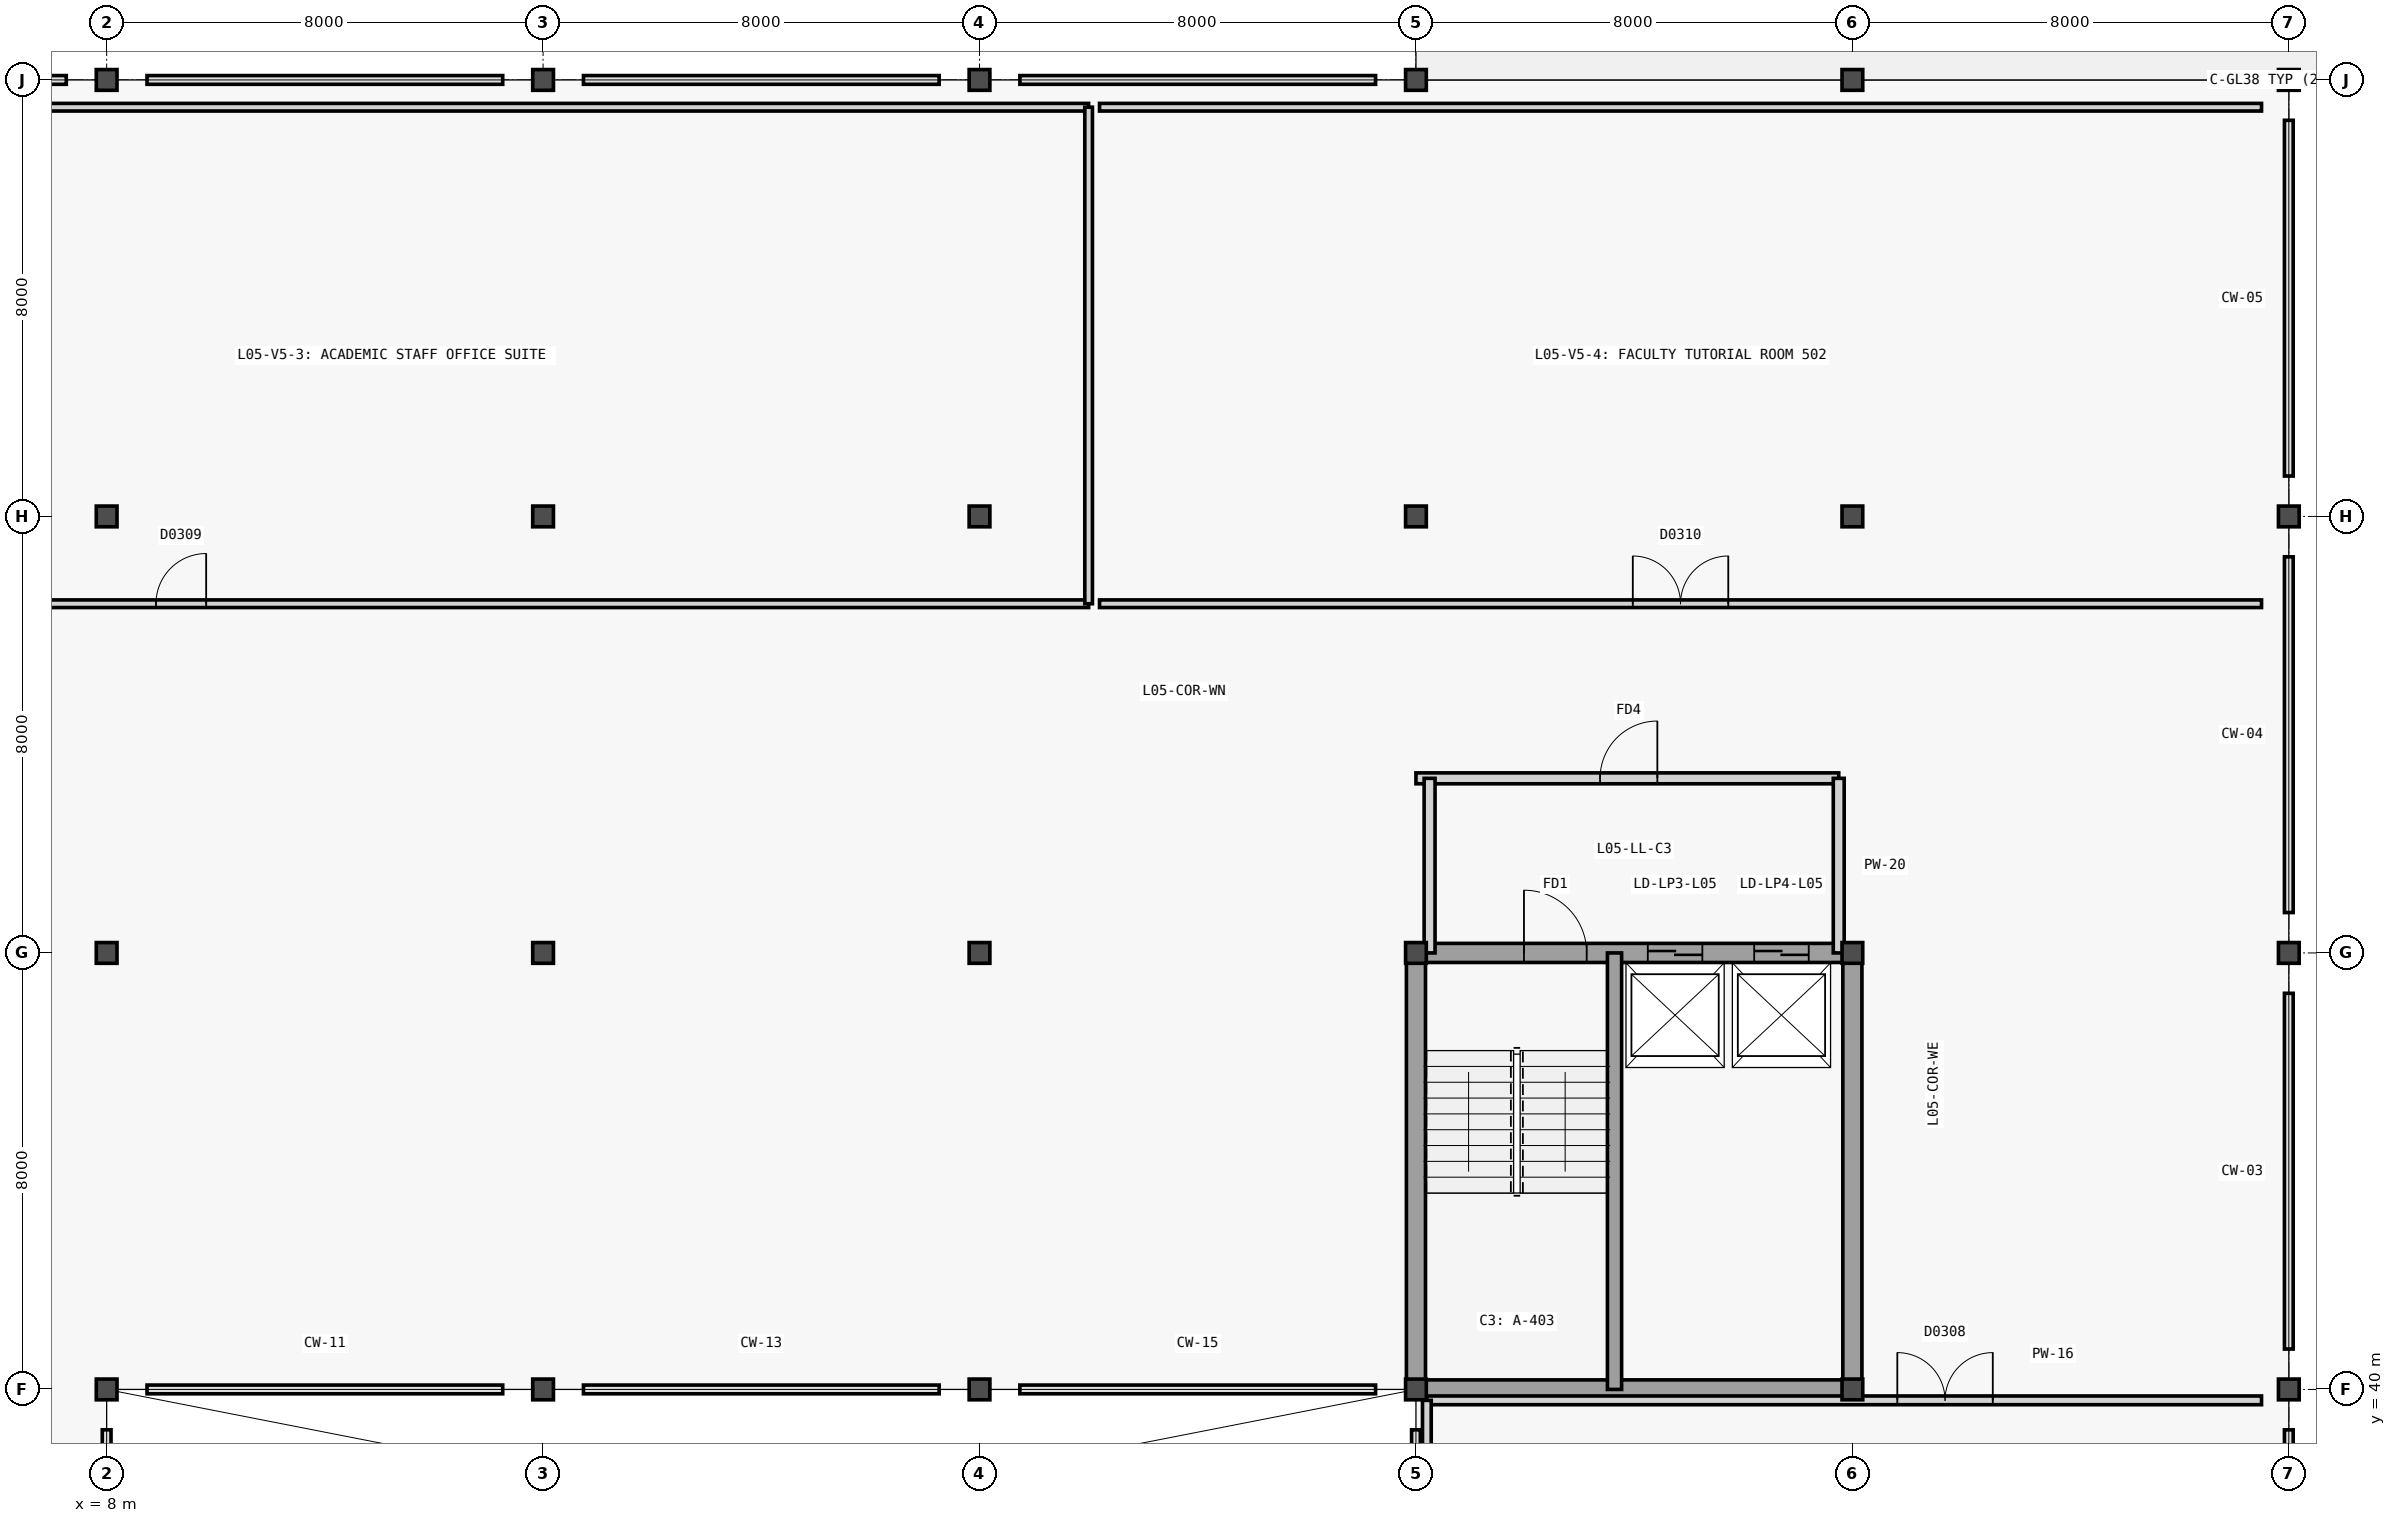
"""IFC4 building model, lengths in metres.
Left out: names, types, materials, properties, quantities, classifications, styles, units other than length and angle.
Written with IfcOpenShell. Run it as: python <this file> out.ifc"""

import sys

from ifc_helpers import new_model, si_unit, direction, frame, frame_2d, origin, origin_2d, place, context, subcontext, project, spatial, rectangle, extrude, element, fill, save


model = new_model("IFC4")
c1 = context("Model", 3, precision=1e-05, world=origin(), true_north=direction((0.0, 1.0)))
c2 = subcontext(c1, "Body", "Model", "MODEL_VIEW")
j1 = project(units=[si_unit("LENGTHUNIT", "METRE"), si_unit("PLANEANGLEUNIT", "RADIAN")], contexts=[c1])
p1 = place(None, origin())
s1 = spatial("IfcSite", under=j1, at=p1, CompositionType="ELEMENT")
p2 = place(p1, origin())
s2 = spatial("IfcBuilding", under=s1, at=p2, CompositionType="ELEMENT")
p3 = place(p2, frame((0.0, 0.0, 21.6)))
s3 = spatial("IfcBuildingStorey", under=s2, at=p3, CompositionType="ELEMENT", Elevation=21.6)
for number, where, z_axis, x_axis in (
    (1, (8.0, 40.0, 0.0), (0.0, 0.0, 1.0), (1.0, 0.0, 0.0)),
    (2, (8.0, 48.0, 0.0), (0.0, 0.0, 1.0), (1.0, 0.0, 0.0)),
    (3, (8.0, 56.0, 0.0), (0.0, 0.0, 1.0), (1.0, 0.0, 0.0)),
    (4, (8.0, 64.0, 0.0), (0.0, 0.0, 1.0), (1.0, 0.0, 0.0)),
    (5, (16.0, 40.0, 0.0), (0.0, 0.0, 1.0), (1.0, 0.0, 0.0)),
    (6, (16.0, 48.0, 0.0), (0.0, 0.0, 1.0), (1.0, 0.0, 0.0)),
    (7, (16.0, 56.0, 0.0), (0.0, 0.0, 1.0), (1.0, 0.0, 0.0)),
    (8, (16.0, 64.0, 0.0), (0.0, 0.0, 1.0), (1.0, 0.0, 0.0)),
    (9, (24.0, 40.0, 0.0), (0.0, 0.0, 1.0), (1.0, 0.0, 0.0)),
    (10, (24.0, 48.0, 0.0), (0.0, 0.0, 1.0), (1.0, 0.0, 0.0)),
    (11, (24.0, 56.0, 0.0), (0.0, 0.0, 1.0), (1.0, 0.0, 0.0)),
    (12, (24.0, 64.0, 0.0), (0.0, 0.0, 1.0), (1.0, 0.0, 0.0)),
    (13, (32.0, 40.0, 0.0), (0.0, 0.0, 1.0), (1.0, 0.0, 0.0)),
    (14, (32.0, 48.0, 0.0), (0.0, 0.0, 1.0), (1.0, 0.0, 0.0)),
    (15, (32.0, 56.0, 0.0), (0.0, 0.0, 1.0), (1.0, 0.0, 0.0)),
    (16, (32.0, 64.0, 0.0), (0.0, 0.0, 1.0), (1.0, 0.0, 0.0)),
    (17, (40.0, 40.0, 0.0), (0.0, 0.0, 1.0), (1.0, 0.0, 0.0)),
    (18, (40.0, 48.0, 0.0), (0.0, 0.0, 1.0), (1.0, 0.0, 0.0)),
    (19, (40.0, 56.0, 0.0), (0.0, 0.0, 1.0), (1.0, 0.0, 0.0)),
    (20, (40.0, 64.0, 0.0), (0.0, 0.0, 1.0), (1.0, 0.0, 0.0)),
):
    element("IfcColumn", number, at=place(p3, frame(where, z_axis=z_axis, x_axis=x_axis)), inside=s3, PredefinedType="COLUMN", context=c2, shape_type="SweptSolid", body=[
        extrude(rectangle(XDim=0.38, YDim=0.38, at=origin_2d()), origin(), (0.0, 0.0, 1.0), 3.6),
    ])
for number, where, z_axis, x_axis in (
    (21, (48.0, 40.0, 0.0), (0.0, 0.0, 1.0), (1.0, 0.0, 0.0)),
    (22, (48.0, 48.0, 0.0), (0.0, 0.0, 1.0), (1.0, 0.0, 0.0)),
    (23, (48.0, 56.0, 0.0), (0.0, 0.0, 1.0), (1.0, 0.0, 0.0)),
    (24, (48.0, 64.0, 0.0), (0.0, 0.0, 1.0), (1.0, 0.0, 0.0)),
):
    element("IfcColumn", number, at=place(p3, frame(where, z_axis=z_axis, x_axis=x_axis)), inside=s3, PredefinedType="COLUMN", context=c2, shape_type="SweptSolid", body=[
        extrude(rectangle(XDim=0.38, YDim=0.38, at=origin_2d()), origin(), (0.0, 0.0, 1.0), 3.36),
    ])
for number, where, z_axis, x_axis in (
    (25, (32.0, 40.0, 0.0), (0.0, 0.0, 1.0), (1.0, 0.0, 0.0)),
    (26, (32.0, 40.0, 0.0), (0.0, 0.0, 1.0), (0.0, 1.0, 0.0)),
    (27, (40.0, 40.0, 0.0), (0.0, 0.0, 1.0), (0.0, 1.0, 0.0)),
):
    element("IfcWall", number, at=place(p3, frame(where, z_axis=z_axis, x_axis=x_axis)), inside=s3, PredefinedType="SHEAR", context=c2, shape_type="SweptSolid", body=[
        extrude(rectangle(XDim=8.0, YDim=0.35, at=frame_2d((4.0, 0.0))), origin(), (0.0, 0.0, 1.0), 3.6),
    ])
p4 = place(p3, frame((32.0, 48.0, 0.0), z_axis=(0.0, 0.0, 1.0), x_axis=(1.0, 0.0, 0.0)))
e28 = element("IfcWall", 28, at=p4, inside=s3, PredefinedType="SHEAR", context=c2, shape_type="SweptSolid", body=[
    extrude(rectangle(XDim=8.0, YDim=0.35, at=frame_2d((4.0, 0.0))), origin(), (0.0, 0.0, 1.0), 3.6),
])
p5 = place(p4, frame((1.98, 0.0, 0.0)))
e29 = element("IfcOpeningElement", 29, at=p5, cuts=e28, PredefinedType="OPENING", context=c2, shape_type="SweptSolid", body=[
    extrude(rectangle(XDim=1.15, YDim=2.2, at=frame_2d((0.575, 1.1))), frame((0.0, 0.185, 0.0), z_axis=(0.0, -1.0, 0.0), x_axis=(1.0, 0.0, 0.0)), (0.0, 0.0, 1.0), 0.37),
])
p6 = place(p4, frame((4.25, 0.0, 0.0)))
e30 = element("IfcOpeningElement", 30, at=p6, cuts=e28, PredefinedType="OPENING", context=c2, shape_type="SweptSolid", body=[
    extrude(rectangle(XDim=1.0, YDim=2.15, at=frame_2d((0.5, 1.075))), frame((0.0, 0.185, 0.0), z_axis=(0.0, -1.0, 0.0), x_axis=(1.0, 0.0, 0.0)), (0.0, 0.0, 1.0), 0.37),
])
p7 = place(p4, frame((6.2, 0.0, 0.0)))
e31 = element("IfcOpeningElement", 31, at=p7, cuts=e28, PredefinedType="OPENING", context=c2, shape_type="SweptSolid", body=[
    extrude(rectangle(XDim=1.0, YDim=2.15, at=frame_2d((0.5, 1.075))), frame((0.0, 0.185, 0.0), z_axis=(0.0, -1.0, 0.0), x_axis=(1.0, 0.0, 0.0)), (0.0, 0.0, 1.0), 0.37),
])
p8 = place(p3, frame((35.64, 40.0, 0.0), z_axis=(0.0, 0.0, 1.0), x_axis=(0.0, 1.0, 0.0)))
e32 = element("IfcWall", 32, at=p8, inside=s3, PredefinedType="SHEAR", context=c2, shape_type="SweptSolid", body=[
    extrude(rectangle(XDim=8.0, YDim=0.26, at=frame_2d((4.0, 0.0))), origin(), (0.0, 0.0, 1.0), 3.6),
])
p9 = place(p3, frame((32.0, 51.2, 0.0), z_axis=(0.0, 0.0, 1.0), x_axis=(1.0, 0.0, 0.0)))
e33 = element("IfcWall", 33, at=p9, inside=s3, PredefinedType="PARTITIONING", context=c2, shape_type="SweptSolid", body=[
    extrude(rectangle(XDim=7.75, YDim=0.2, at=frame_2d((3.875, 0.0))), origin(), (0.0, 0.0, 1.0), 3.32),
])
p10 = place(p9, frame((3.375, 0.0, 0.0)))
e34 = element("IfcOpeningElement", 34, at=p10, cuts=e33, PredefinedType="OPENING", context=c2, shape_type="SweptSolid", body=[
    extrude(rectangle(XDim=1.05, YDim=2.15, at=frame_2d((0.525, 1.075))), frame((0.0, 0.11, 0.0), z_axis=(0.0, -1.0, 0.0), x_axis=(1.0, 0.0, 0.0)), (0.0, 0.0, 1.0), 0.22),
])
p11 = place(p3, frame((39.75, 48.0, 0.0), z_axis=(0.0, 0.0, 1.0), x_axis=(0.0, 1.0, 0.0)))
e35 = element("IfcWall", 35, at=p11, inside=s3, PredefinedType="PARTITIONING", context=c2, shape_type="SweptSolid", body=[
    extrude(rectangle(XDim=3.2, YDim=0.2, at=frame_2d((1.6, 0.0))), origin(), (0.0, 0.0, 1.0), 2.8),
])
p12 = place(p3, frame((32.25, 48.0, 0.0), z_axis=(0.0, 0.0, 1.0), x_axis=(0.0, 1.0, 0.0)))
e36 = element("IfcWall", 36, at=p12, inside=s3, PredefinedType="PARTITIONING", context=c2, shape_type="SweptSolid", body=[
    extrude(rectangle(XDim=3.2, YDim=0.2, at=frame_2d((1.6, 0.0))), origin(), (0.0, 0.0, 1.0), 2.84),
])
p13 = place(p3, frame((32.2, 39.8, 0.0), z_axis=(0.0, 0.0, 1.0), x_axis=(1.0, 0.0, 0.0)))
e37 = element("IfcWall", 37, at=p13, inside=s3, PredefinedType="PARTITIONING", context=c2, shape_type="SweptSolid", body=[
    extrude(rectangle(XDim=15.3, YDim=0.16, at=frame_2d((7.65, 0.0))), origin(), (0.0, 0.0, 1.0), 2.72),
])
p14 = place(p13, frame((8.624, 0.0, 0.0)))
e38 = element("IfcOpeningElement", 38, at=p14, cuts=e37, PredefinedType="OPENING", context=c2, shape_type="SweptSolid", body=[
    extrude(rectangle(XDim=1.75, YDim=2.2, at=frame_2d((0.875, 1.1))), frame((0.0, 0.09, 0.0), z_axis=(0.0, -1.0, 0.0), x_axis=(1.0, 0.0, 0.0)), (0.0, 0.0, 1.0), 0.18),
])
p15 = place(p3, frame((32.2, 16.5, 0.0), z_axis=(0.0, 0.0, 1.0), x_axis=(0.0, 1.0, 0.0)))
e39 = element("IfcWall", 39, at=p15, inside=s3, PredefinedType="PARTITIONING", context=c2, shape_type="SweptSolid", body=[
    extrude(rectangle(XDim=23.3, YDim=0.16, at=frame_2d((11.65, 0.0))), origin(), (0.0, 0.0, 1.0), 2.8),
])
p16 = place(p3, frame((0.6, 54.4, 0.0), z_axis=(0.0, 0.0, 1.0), x_axis=(1.0, 0.0, 0.0)))
e40 = element("IfcWall", 40, at=p16, inside=s3, PredefinedType="PARTITIONING", context=c2, shape_type="SweptSolid", body=[
    extrude(rectangle(XDim=25.4, YDim=0.14, at=frame_2d((12.7, 0.0))), origin(), (0.0, 0.0, 1.0), 3.34),
])
p17 = place(p16, frame((8.304, 0.0, 0.0)))
e41 = element("IfcOpeningElement", 41, at=p17, cuts=e40, PredefinedType="OPENING", context=c2, shape_type="SweptSolid", body=[
    extrude(rectangle(XDim=0.92, YDim=2.15, at=frame_2d((0.46, 1.075))), frame((0.0, 0.08, 0.0), z_axis=(0.0, -1.0, 0.0), x_axis=(1.0, 0.0, 0.0)), (0.0, 0.0, 1.0), 0.16),
])
p18 = place(p3, frame((0.6, 63.5, 0.0), z_axis=(0.0, 0.0, 1.0), x_axis=(1.0, 0.0, 0.0)))
e42 = element("IfcWall", 42, at=p18, inside=s3, PredefinedType="PARTITIONING", context=c2, shape_type="SweptSolid", body=[
    extrude(rectangle(XDim=25.4, YDim=0.14, at=frame_2d((12.7, 0.0))), origin(), (0.0, 0.0, 1.0), 3.34),
])
p19 = place(p3, frame((26.0, 54.4, 0.0), z_axis=(0.0, 0.0, 1.0), x_axis=(0.0, 1.0, 0.0)))
e43 = element("IfcWall", 43, at=p19, inside=s3, PredefinedType="PARTITIONING", context=c2, shape_type="SweptSolid", body=[
    extrude(rectangle(XDim=9.1, YDim=0.14, at=frame_2d((4.55, 0.0))), origin(), (0.0, 0.0, 1.0), 3.34),
])
p20 = place(p3, frame((26.2, 54.4, 0.0), z_axis=(0.0, 0.0, 1.0), x_axis=(1.0, 0.0, 0.0)))
e44 = element("IfcWall", 44, at=p20, inside=s3, PredefinedType="PARTITIONING", context=c2, shape_type="SweptSolid", body=[
    extrude(rectangle(XDim=21.3, YDim=0.14, at=frame_2d((10.65, 0.0))), origin(), (0.0, 0.0, 1.0), 3.34),
])
p21 = place(p20, frame((9.775, 0.0, 0.0)))
e45 = element("IfcOpeningElement", 45, at=p21, cuts=e44, PredefinedType="OPENING", context=c2, shape_type="SweptSolid", body=[
    extrude(rectangle(XDim=1.75, YDim=2.2, at=frame_2d((0.875, 1.1))), frame((0.0, 0.08, 0.0), z_axis=(0.0, -1.0, 0.0), x_axis=(1.0, 0.0, 0.0)), (0.0, 0.0, 1.0), 0.16),
])
p22 = place(p3, frame((26.2, 63.5, 0.0), z_axis=(0.0, 0.0, 1.0), x_axis=(1.0, 0.0, 0.0)))
e46 = element("IfcWall", 46, at=p22, inside=s3, PredefinedType="PARTITIONING", context=c2, shape_type="SweptSolid", body=[
    extrude(rectangle(XDim=21.3, YDim=0.14, at=frame_2d((10.65, 0.0))), origin(), (0.0, 0.0, 1.0), 3.34),
])
p23 = place(p5, origin())
e47 = element("IfcDoor", 47, at=p23, inside=s3, OperationType="SINGLE_SWING_LEFT", PredefinedType="DOOR", context=c2, shape_type="SweptSolid", body=[
    extrude(rectangle(XDim=1.15, YDim=2.2, at=frame_2d((0.575, 1.1))), frame((0.0, 0.025, 0.0), z_axis=(0.0, -1.0, 0.0), x_axis=(1.0, 0.0, 0.0)), (0.0, 0.0, 1.0), 0.05),
])
fill(e29, e47)
p24 = place(p6, origin())
e48 = element("IfcDoor", 48, at=p24, inside=s3, OperationType="DOUBLE_DOOR_SLIDING", PredefinedType="DOOR", context=c2, shape_type="SweptSolid", body=[
    extrude(rectangle(XDim=1.0, YDim=2.15, at=frame_2d((0.5, 1.075))), frame((0.0, 0.025, 0.0), z_axis=(0.0, -1.0, 0.0), x_axis=(1.0, 0.0, 0.0)), (0.0, 0.0, 1.0), 0.05),
])
fill(e30, e48)
p25 = place(p7, origin())
e49 = element("IfcDoor", 49, at=p25, inside=s3, OperationType="DOUBLE_DOOR_SLIDING", PredefinedType="DOOR", context=c2, shape_type="SweptSolid", body=[
    extrude(rectangle(XDim=1.0, YDim=2.15, at=frame_2d((0.5, 1.075))), frame((0.0, 0.025, 0.0), z_axis=(0.0, -1.0, 0.0), x_axis=(1.0, 0.0, 0.0)), (0.0, 0.0, 1.0), 0.05),
])
fill(e31, e49)
p26 = place(p10, origin())
e50 = element("IfcDoor", 50, at=p26, inside=s3, OperationType="SINGLE_SWING_RIGHT", PredefinedType="DOOR", context=c2, shape_type="SweptSolid", body=[
    extrude(rectangle(XDim=1.05, YDim=2.15, at=frame_2d((0.525, 1.075))), frame((0.0, 0.025, 0.0), z_axis=(0.0, -1.0, 0.0), x_axis=(1.0, 0.0, 0.0)), (0.0, 0.0, 1.0), 0.05),
])
fill(e34, e50)
p27 = place(p14, origin())
e51 = element("IfcDoor", 51, at=p27, inside=s3, OperationType="DOUBLE_DOOR_SINGLE_SWING", PredefinedType="DOOR", context=c2, shape_type="SweptSolid", body=[
    extrude(rectangle(XDim=1.75, YDim=2.2, at=frame_2d((0.875, 1.1))), frame((0.0, 0.025, 0.0), z_axis=(0.0, -1.0, 0.0), x_axis=(1.0, 0.0, 0.0)), (0.0, 0.0, 1.0), 0.05),
])
fill(e38, e51)
p28 = place(p17, origin())
e52 = element("IfcDoor", 52, at=p28, inside=s3, OperationType="SINGLE_SWING_RIGHT", PredefinedType="DOOR", context=c2, shape_type="SweptSolid", body=[
    extrude(rectangle(XDim=0.92, YDim=2.15, at=frame_2d((0.46, 1.075))), frame((0.0, 0.025, 0.0), z_axis=(0.0, -1.0, 0.0), x_axis=(1.0, 0.0, 0.0)), (0.0, 0.0, 1.0), 0.05),
])
fill(e41, e52)
p29 = place(p21, origin())
e53 = element("IfcDoor", 53, at=p29, inside=s3, OperationType="DOUBLE_DOOR_SINGLE_SWING", PredefinedType="DOOR", context=c2, shape_type="SweptSolid", body=[
    extrude(rectangle(XDim=1.75, YDim=2.2, at=frame_2d((0.875, 1.1))), frame((0.0, 0.025, 0.0), z_axis=(0.0, -1.0, 0.0), x_axis=(1.0, 0.0, 0.0)), (0.0, 0.0, 1.0), 0.05),
])
fill(e45, e53)
save(model, sys.argv[1])
